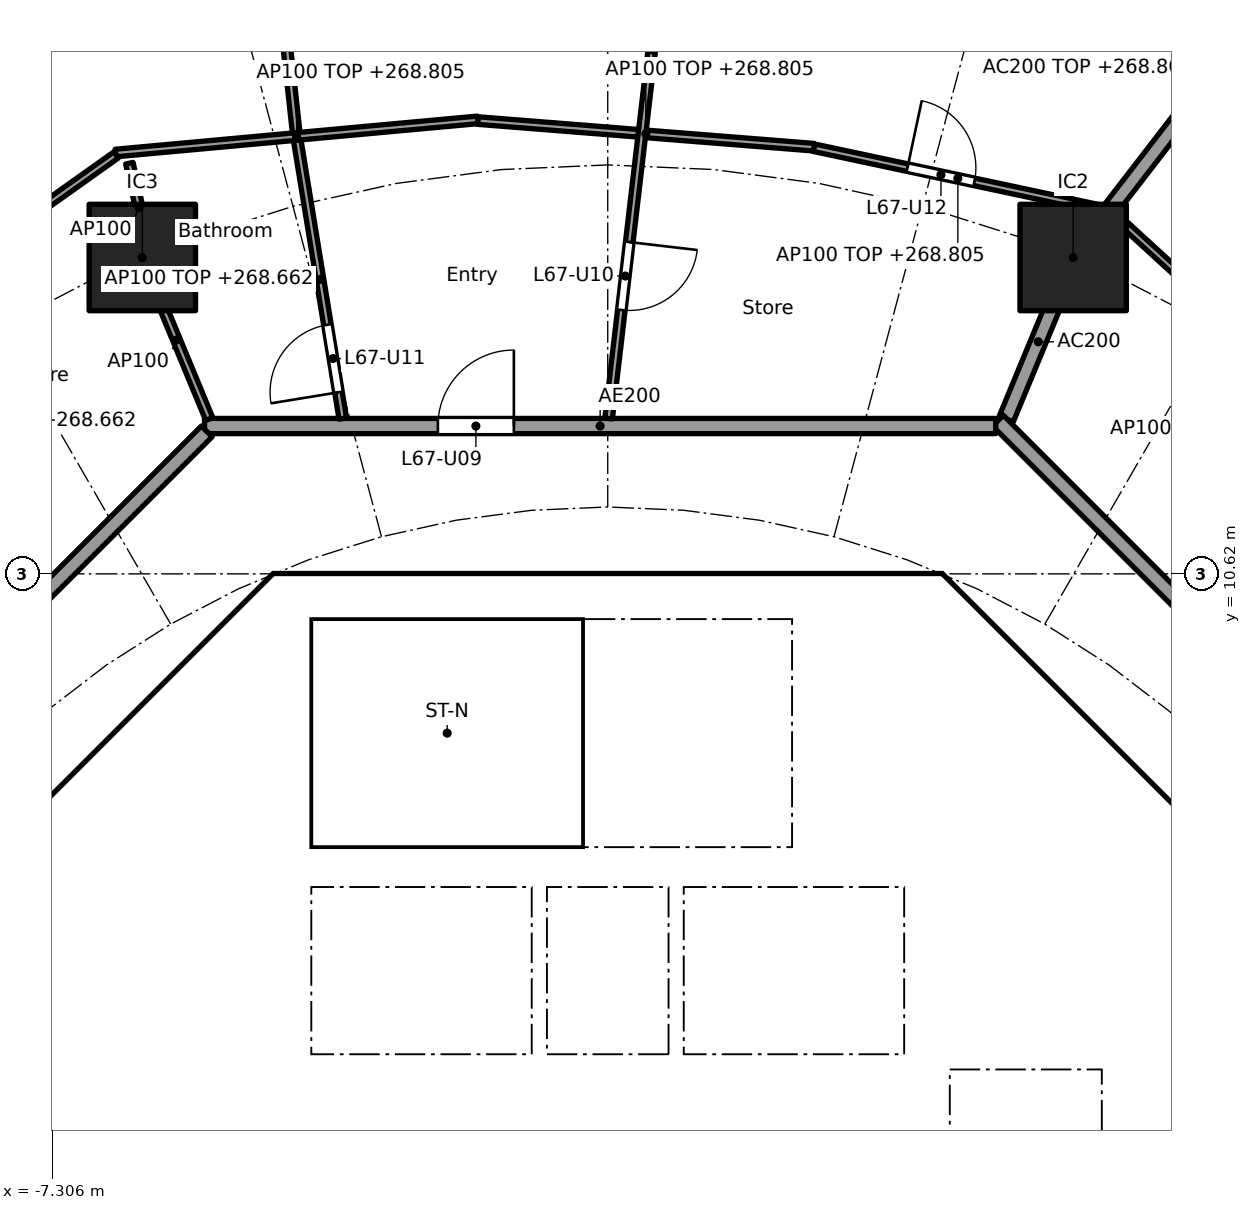
"""IFC4 building model, lengths in metres.
Left out: names, types, materials, properties, quantities, classifications, styles, units other than length and angle.
Written with IfcOpenShell. Run it as: python <this file> out.ifc"""

import sys

from ifc_helpers import new_model, si_unit, direction, frame, frame_2d, origin, origin_2d, place, context, subcontext, project, spatial, polyline, rectangle, outline, extrude, element, fill, save


model = new_model("IFC4")
c1 = context("Model", 3, precision=1e-05, world=origin(), true_north=direction((0.0, 1.0)))
c2 = subcontext(c1, "Body", "Model", "MODEL_VIEW")
j1 = project(units=[si_unit("LENGTHUNIT", "METRE"), si_unit("PLANEANGLEUNIT", "RADIAN")], contexts=[c1])
p1 = place(None, origin())
s1 = spatial("IfcSite", under=j1, at=p1, CompositionType="ELEMENT")
p2 = place(p1, origin())
s2 = spatial("IfcBuilding", under=s1, at=p2, CompositionType="ELEMENT")
p3 = place(p2, frame((0.0, 0.0, 265.9)))
s3 = spatial("IfcBuildingStorey", under=s2, at=p3, CompositionType="ELEMENT", Elevation=265.9)
for number, where, z_axis, x_axis in (
    (1, (6.123, 14.782, 0.0), (0.0, 0.0, 1.0), (1.0, 0.0, 0.0)),
    (2, (-6.123, 14.782, 0.0), (0.0, 0.0, 1.0), (1.0, 0.0, 0.0)),
):
    element("IfcColumn", number, at=place(p3, frame(where, z_axis=z_axis, x_axis=x_axis)), inside=s3, PredefinedType="COLUMN", context=c2, shape_type="SweptSolid", body=[
        extrude(rectangle(XDim=1.4, YDim=1.4, at=origin_2d()), origin(), (0.0, 0.0, 1.0), 3.7),
    ])
p4 = place(p3, frame((9.988, 4.613, 0.0), z_axis=(0.0, 0.0, 1.0), x_axis=(-0.707106781187, 0.707106781187, 0.0)))
e3 = element("IfcWall", 3, at=p4, inside=s3, PredefinedType="SHEAR", context=c2, shape_type="SweptSolid", body=[
    extrude(rectangle(XDim=7.602, YDim=0.6, at=frame_2d((3.801, 0.0))), origin(), (0.0, 0.0, 1.0), 3.44),
])
p5 = place(p4, frame((3.201, 0.0, 0.0)))
e4 = element("IfcOpeningElement", 4, at=p5, cuts=e3, PredefinedType="OPENING", context=c2, shape_type="SweptSolid", body=[
    extrude(rectangle(XDim=1.2, YDim=2.1, at=frame_2d((0.6, 1.05))), frame((0.0, 0.31, 0.0), z_axis=(0.0, -1.0, 0.0), x_axis=(1.0, 0.0, 0.0)), (0.0, 0.0, 1.0), 0.62),
])
p6 = place(p3, frame((-4.613, 9.988, 0.0), z_axis=(0.0, 0.0, 1.0), x_axis=(-0.707106781187, -0.707106781187, 0.0)))
e5 = element("IfcWall", 5, at=p6, inside=s3, PredefinedType="SHEAR", context=c2, shape_type="SweptSolid", body=[
    extrude(rectangle(XDim=7.602, YDim=0.6, at=frame_2d((3.801, 0.0))), origin(), (0.0, 0.0, 1.0), 3.44),
])
p7 = place(p6, frame((0.351, 0.0, 0.0)))
e6 = element("IfcOpeningElement", 6, at=p7, cuts=e5, PredefinedType="OPENING", context=c2, shape_type="SweptSolid", body=[
    extrude(rectangle(XDim=1.1, YDim=2.1, at=frame_2d((0.55, 1.05))), frame((0.0, 0.31, 0.0), z_axis=(0.0, -1.0, 0.0), x_axis=(1.0, 0.0, 0.0)), (0.0, 0.0, 1.0), 0.62),
])
p8 = place(p3, frame((-5.8, 4.3, 0.0), z_axis=(0.0, 0.0, 1.0), x_axis=(0.0, 1.0, 0.0)))
e7 = element("IfcWall", 7, at=p8, inside=s3, PredefinedType="PARTITIONING", context=c2, shape_type="SweptSolid", body=[
    extrude(rectangle(XDim=3.927, YDim=0.15, at=frame_2d((1.963, 0.0))), origin(), (0.0, 0.0, 1.0), 3.44),
])
p9 = place(p8, frame((0.262, 0.0, 0.0)))
e8 = element("IfcOpeningElement", 8, at=p9, cuts=e7, PredefinedType="OPENING", context=c2, shape_type="SweptSolid", body=[
    extrude(rectangle(XDim=0.9, YDim=2.1, at=frame_2d((0.45, 1.05))), frame((0.0, 0.085, 0.0), z_axis=(0.0, -1.0, 0.0), x_axis=(1.0, 0.0, 0.0)), (0.0, 0.0, 1.0), 0.17),
])
p10 = place(p8, frame((2.338, 0.0, 0.0)))
e9 = element("IfcOpeningElement", 9, at=p10, cuts=e7, PredefinedType="OPENING", context=c2, shape_type="SweptSolid", body=[
    extrude(rectangle(XDim=0.9, YDim=2.1, at=frame_2d((0.45, 1.05))), frame((0.0, 0.085, 0.0), z_axis=(0.0, -1.0, 0.0), x_axis=(1.0, 0.0, 0.0)), (0.0, 0.0, 1.0), 0.17),
])
p11 = place(p3, frame((4.0, 4.3, 0.0), z_axis=(0.0, 0.0, 1.0), x_axis=(0.0, 1.0, 0.0)))
e10 = element("IfcWall", 10, at=p11, inside=s3, PredefinedType="SOLIDWALL", context=c2, shape_type="SweptSolid", body=[
    extrude(rectangle(XDim=2.2, YDim=0.2, at=frame_2d((1.1, 0.0))), origin(), (0.0, 0.0, 1.0), 3.44),
])
p12 = place(p11, frame((0.55, 0.0, 0.0)))
e11 = element("IfcOpeningElement", 11, at=p12, cuts=e10, PredefinedType="OPENING", context=c2, shape_type="SweptSolid", body=[
    extrude(rectangle(XDim=1.1, YDim=2.1, at=frame_2d((0.55, 1.05))), frame((0.0, 0.11, 0.0), z_axis=(0.0, -1.0, 0.0), x_axis=(1.0, 0.0, 0.0)), (0.0, 0.0, 1.0), 0.22),
])
p13 = place(p3, frame((-4.0, 4.3, 0.0), z_axis=(0.0, 0.0, 1.0), x_axis=(0.0, 1.0, 0.0)))
e12 = element("IfcWall", 12, at=p13, inside=s3, PredefinedType="SOLIDWALL", context=c2, shape_type="SweptSolid", body=[
    extrude(rectangle(XDim=2.2, YDim=0.2, at=frame_2d((1.1, 0.0))), origin(), (0.0, 0.0, 1.0), 3.44),
])
p14 = place(p13, frame((0.55, 0.0, 0.0)))
e13 = element("IfcOpeningElement", 13, at=p14, cuts=e12, PredefinedType="OPENING", context=c2, shape_type="SweptSolid", body=[
    extrude(rectangle(XDim=1.1, YDim=2.1, at=frame_2d((0.55, 1.05))), frame((0.0, 0.11, 0.0), z_axis=(0.0, -1.0, 0.0), x_axis=(1.0, 0.0, 0.0)), (0.0, 0.0, 1.0), 0.22),
])
p15 = place(p3, frame((6.7, 4.0, 0.0), z_axis=(0.0, 0.0, 1.0), x_axis=(1.0, 0.0, 0.0)))
e14 = element("IfcWall", 14, at=p15, inside=s3, PredefinedType="SOLIDWALL", context=c2, shape_type="SweptSolid", body=[
    extrude(rectangle(XDim=3.325, YDim=0.2, at=frame_2d((1.662, 0.0))), origin(), (0.0, 0.0, 1.0), 3.44),
])
p16 = place(p15, frame((1.25, 0.0, 0.0)))
e15 = element("IfcOpeningElement", 15, at=p16, cuts=e14, PredefinedType="OPENING", context=c2, shape_type="SweptSolid", body=[
    extrude(rectangle(XDim=1.1, YDim=2.1, at=frame_2d((0.55, 1.05))), frame((0.0, 0.11, 0.0), z_axis=(0.0, -1.0, 0.0), x_axis=(1.0, 0.0, 0.0)), (0.0, 0.0, 1.0), 0.22),
])
p17 = place(p3, frame((4.0, 7.025, 0.0), z_axis=(0.0, 0.0, 1.0), x_axis=(0.0, 1.0, 0.0)))
e16 = element("IfcWall", 16, at=p17, inside=s3, PredefinedType="SOLIDWALL", context=c2, shape_type="SweptSolid", body=[
    extrude(rectangle(XDim=3.0, YDim=0.2, at=frame_2d((1.5, 0.0))), origin(), (0.0, 0.0, 1.0), 3.44),
])
p18 = place(p17, frame((0.925, 0.0, 0.0)))
e17 = element("IfcOpeningElement", 17, at=p18, cuts=e16, PredefinedType="OPENING", context=c2, shape_type="SweptSolid", body=[
    extrude(rectangle(XDim=1.1, YDim=2.1, at=frame_2d((0.55, 1.05))), frame((0.0, 0.11, 0.0), z_axis=(0.0, -1.0, 0.0), x_axis=(1.0, 0.0, 0.0)), (0.0, 0.0, 1.0), 0.22),
])
p19 = place(p3, origin())
e18 = element("IfcWall", 18, at=p19, inside=s3, PredefinedType="SHEAR", context=c2, shape_type="SweptSolid", body=[
    extrude(outline(polyline([(-4.152, 10.025), (-4.401, 9.776), (-4.825, 10.2), (-4.401, 10.625), (4.401, 10.625), (4.825, 10.2), (4.401, 9.776), (4.152, 10.025), (-4.152, 10.025)])), origin(), (0.0, 0.0, 1.0), 3.44),
])
p20 = place(p3, frame((-10.025, 4.0, 0.0), z_axis=(0.0, 0.0, 1.0), x_axis=(1.0, 0.0, 0.0)))
e19 = element("IfcWall", 19, at=p20, inside=s3, PredefinedType="PARTITIONING", context=c2, shape_type="SweptSolid", body=[
    extrude(rectangle(XDim=3.325, YDim=0.2, at=frame_2d((1.662, 0.0))), origin(), (0.0, 0.0, 1.0), 3.44),
])
p21 = place(p3, frame((-8.301, 5.8, 0.0), z_axis=(0.0, 0.0, 1.0), x_axis=(1.0, 0.0, 0.0)))
e20 = element("IfcWall", 20, at=p21, inside=s3, PredefinedType="PARTITIONING", context=c2, shape_type="SweptSolid", body=[
    extrude(rectangle(XDim=2.426, YDim=0.15, at=frame_2d((1.213, 0.0))), origin(), (0.0, 0.0, 1.0), 3.44),
])
for number, where, z_axis, x_axis in (
    (21, (-0.9, 4.3, 0.0), (0.0, 0.0, 1.0), (0.0, 1.0, 0.0)),
    (22, (0.9, 4.3, 0.0), (0.0, 0.0, 1.0), (0.0, 1.0, 0.0)),
):
    element("IfcWall", number, at=place(p3, frame(where, z_axis=z_axis, x_axis=x_axis)), inside=s3, PredefinedType="SOLIDWALL", context=c2, shape_type="SweptSolid", body=[
        extrude(rectangle(XDim=2.2, YDim=0.2, at=frame_2d((1.1, 0.0))), origin(), (0.0, 0.0, 1.0), 3.44),
    ])
p22 = place(p3, origin())
e23 = element("IfcWall", 23, at=p22, inside=s3, PredefinedType="SOLIDWALL", context=c2, shape_type="SweptSolid", body=[
    extrude(outline(polyline([(-6.7, 4.3), (6.7, 4.3), (6.7, 2.1), (6.5, 2.1), (6.5, 4.1), (4.5, 4.1), (4.5, 2.1), (4.3, 2.1), (4.3, 4.1), (2.3, 4.1), (2.3, 2.1), (2.1, 2.1), (2.1, 4.1), (0.1, 4.1), (0.1, 2.1), (-0.1, 2.1), (-0.1, 4.1), (-4.3, 4.1), (-4.3, 2.1), (-4.5, 2.1), (-4.5, 4.1), (-6.5, 4.1), (-6.5, 2.1), (-6.7, 2.1), (-6.7, 4.3)])), origin(), (0.0, 0.0, 1.0), 3.44),
])
p23 = place(p3, origin())
e24 = element("IfcWall", 24, at=p23, inside=s3, PredefinedType="SOLIDWALL", context=c2, shape_type="SweptSolid", body=[
    extrude(outline(polyline([(-3.9, 7.025), (-4.1, 7.025), (-4.1, 10.025), (-3.9, 10.025), (-3.9, 7.025)])), origin(), (0.0, 0.0, 1.0), 3.44),
])
p24 = place(p3, origin())
e25 = element("IfcWall", 25, at=p24, inside=s3, PredefinedType="SOLIDWALL", context=c2, shape_type="SweptSolid", body=[
    extrude(outline(polyline([(4.1, 6.5), (-4.1, 6.5), (-4.1, 7.025), (4.1, 7.025), (4.1, 6.5)])), origin(), (0.0, 0.0, 1.0), 3.44),
])
p25 = place(p3, origin())
e26 = element("IfcWall", 26, at=p25, inside=s3, PredefinedType="SOLIDWALL", context=c2, shape_type="SweptSolid", body=[
    extrude(outline(polyline([(7.025, -3.9), (6.7, -3.9), (6.7, 3.9), (7.025, 3.9), (7.025, -3.9)])), origin(), (0.0, 0.0, 1.0), 3.44),
])
p26 = place(p3, frame((5.243, 12.657, 0.0), z_axis=(0.0, 0.0, 1.0), x_axis=(0.382691608661, 0.923876145736, 0.0)))
e27 = element("IfcWall", 27, at=p26, inside=s3, PredefinedType="PARTITIONING", context=c2, shape_type="SweptSolid", body=[
    extrude(rectangle(XDim=2.2, YDim=0.2, at=frame_2d((1.1, 0.0))), origin(), (0.0, 0.0, 1.0), 3.44),
])
p27 = place(p3, frame((6.154, 14.822, 0.0), z_axis=(0.0, 0.0, 1.0), x_axis=(0.610687612043, 0.791871606068, 0.0)))
e28 = element("IfcWall", 28, at=p27, inside=s3, PredefinedType="PARTITIONING", context=c2, shape_type="SweptSolid", body=[
    extrude(rectangle(XDim=4.455, YDim=0.2, at=frame_2d((2.228, 0.0))), origin(), (0.0, 0.0, 1.0), 2.905),
])
p28 = place(p3, frame((12.635, 5.134, 0.0), z_axis=(0.0, 0.0, 1.0), x_axis=(-0.707106781187, 0.707106781187, 0.0)))
e29 = element("IfcWall", 29, at=p28, inside=s3, PredefinedType="PARTITIONING", context=c2, shape_type="SweptSolid", body=[
    extrude(rectangle(XDim=10.609, YDim=0.2, at=frame_2d((5.305, 0.0))), origin(), (0.0, 0.0, 1.0), 3.44),
])
p29 = place(p3, frame((5.104, 12.565, 0.0), z_axis=(0.0, 0.0, 1.0), x_axis=(-1.0, 0.0, 0.0)))
e30 = element("IfcWall", 30, at=p29, inside=s3, PredefinedType="PARTITIONING", context=c2, shape_type="SweptSolid", body=[
    extrude(rectangle(XDim=10.409, YDim=0.2, at=frame_2d((5.205, 0.0))), origin(), (0.0, 0.0, 1.0), 3.44),
])
p30 = place(p29, frame((6.339, 0.0, 0.0)))
e31 = element("IfcOpeningElement", 31, at=p30, cuts=e30, PredefinedType="OPENING", context=c2, shape_type="SweptSolid", body=[
    extrude(rectangle(XDim=1.0, YDim=2.1, at=frame_2d((0.5, 1.05))), frame((0.0, 0.11, 0.0), z_axis=(0.0, -1.0, 0.0), x_axis=(1.0, 0.0, 0.0)), (0.0, 0.0, 1.0), 0.22),
])
p31 = place(p3, frame((-5.275, 12.494, 0.0), z_axis=(0.0, 0.0, 1.0), x_axis=(-0.707106781187, -0.707106781187, 0.0)))
e32 = element("IfcWall", 32, at=p31, inside=s3, PredefinedType="PARTITIONING", context=c2, shape_type="SweptSolid", body=[
    extrude(rectangle(XDim=10.209, YDim=0.2, at=frame_2d((5.104, 0.0))), origin(), (0.0, 0.0, 1.0), 3.44),
])
p32 = place(p3, frame((10.972, 11.398, 0.0), z_axis=(0.0, 0.0, 1.0), x_axis=(-0.737830272434, 0.674986288069, 0.0)))
e33 = element("IfcWall", 33, at=p32, inside=s3, PredefinedType="PARTITIONING", context=c2, shape_type="SweptSolid", body=[
    extrude(rectangle(XDim=5.827, YDim=0.1, at=frame_2d((2.914, 0.0))), origin(), (0.0, 0.0, 1.0), 2.905),
])
p33 = place(p3, frame((6.5, 15.419, 0.0), z_axis=(0.0, 0.0, 1.0), x_axis=(-0.978053492557, 0.208353943321, 0.0)))
e34 = element("IfcWall", 34, at=p33, inside=s3, PredefinedType="PARTITIONING", context=c2, shape_type="SweptSolid", body=[
    extrude(rectangle(XDim=3.874, YDim=0.1, at=frame_2d((1.937, 0.0))), origin(), (0.0, 0.0, 1.0), 2.905),
])
p34 = place(p33, frame((1.714, 0.0, 0.0)))
e35 = element("IfcOpeningElement", 35, at=p34, cuts=e34, PredefinedType="OPENING", context=c2, shape_type="SweptSolid", body=[
    extrude(rectangle(XDim=0.9, YDim=2.1, at=frame_2d((0.45, 1.05))), frame((0.0, 0.06, 0.0), z_axis=(0.0, -1.0, 0.0), x_axis=(1.0, 0.0, 0.0)), (0.0, 0.0, 1.0), 0.12),
])
p35 = place(p3, frame((2.713, 16.233, 0.0), z_axis=(0.0, 0.0, 1.0), x_axis=(-0.996870142942, 0.079056423588, 0.0)))
e36 = element("IfcWall", 36, at=p35, inside=s3, PredefinedType="PARTITIONING", context=c2, shape_type="SweptSolid", body=[
    extrude(rectangle(XDim=4.438, YDim=0.1, at=frame_2d((2.219, 0.0))), origin(), (0.0, 0.0, 1.0), 2.905),
])
p36 = place(p3, frame((0.012, 12.664, 0.0), z_axis=(0.0, 0.0, 1.0), x_axis=(0.11636251357, 0.993206808996, 0.0)))
e37 = element("IfcWall", 37, at=p36, inside=s3, PredefinedType="PARTITIONING", context=c2, shape_type="SweptSolid", body=[
    extrude(rectangle(XDim=9.765, YDim=0.1, at=frame_2d((4.882, 0.0))), origin(), (0.0, 0.0, 1.0), 2.762),
])
p37 = place(p36, frame((1.437, 0.0, 0.0)))
e38 = element("IfcOpeningElement", 38, at=p37, cuts=e37, PredefinedType="OPENING", context=c2, shape_type="SweptSolid", body=[
    extrude(rectangle(XDim=0.9, YDim=2.1, at=frame_2d((0.45, 1.05))), frame((0.0, 0.06, 0.0), z_axis=(0.0, -1.0, 0.0), x_axis=(1.0, 0.0, 0.0)), (0.0, 0.0, 1.0), 0.12),
])
p38 = place(p36, frame((6.319, 0.0, 0.0)))
e39 = element("IfcOpeningElement", 39, at=p38, cuts=e37, PredefinedType="OPENING", context=c2, shape_type="SweptSolid", body=[
    extrude(rectangle(XDim=0.9, YDim=2.1, at=frame_2d((0.45, 1.05))), frame((0.0, 0.06, 0.0), z_axis=(0.0, -1.0, 0.0), x_axis=(1.0, 0.0, 0.0)), (0.0, 0.0, 1.0), 0.12),
])
p39 = place(p3, frame((-1.711, 16.592, 0.0), z_axis=(0.0, 0.0, 1.0), x_axis=(-0.995843707015, -0.091078599017, 0.0)))
e40 = element("IfcWall", 40, at=p39, inside=s3, PredefinedType="PARTITIONING", context=c2, shape_type="SweptSolid", body=[
    extrude(rectangle(XDim=4.785, YDim=0.1, at=frame_2d((2.392, 0.0))), origin(), (0.0, 0.0, 1.0), 2.905),
])
p40 = place(p3, frame((-3.486, 12.663, 0.0), z_axis=(0.0, 0.0, 1.0), x_axis=(-0.161602751674, 0.986855891532, 0.0)))
e41 = element("IfcWall", 41, at=p40, inside=s3, PredefinedType="PARTITIONING", context=c2, shape_type="SweptSolid", body=[
    extrude(rectangle(XDim=3.71, YDim=0.1, at=frame_2d((1.855, 0.0))), origin(), (0.0, 0.0, 1.0), 2.762),
])
p41 = place(p40, frame((0.35, 0.0, 0.0)))
e42 = element("IfcOpeningElement", 42, at=p41, cuts=e41, PredefinedType="OPENING", context=c2, shape_type="SweptSolid", body=[
    extrude(rectangle(XDim=0.9, YDim=2.1, at=frame_2d((0.45, 1.05))), frame((0.0, 0.06, 0.0), z_axis=(0.0, -1.0, 0.0), x_axis=(1.0, 0.0, 0.0)), (0.0, 0.0, 1.0), 0.12),
])
p42 = place(p3, frame((-4.099, 16.424, 0.0), z_axis=(0.0, 0.0, 1.0), x_axis=(-0.10867295252, 0.99407755703, 0.0)))
e43 = element("IfcWall", 43, at=p42, inside=s3, PredefinedType="PARTITIONING", context=c2, shape_type="SweptSolid", body=[
    extrude(rectangle(XDim=5.974, YDim=0.1, at=frame_2d((2.987, 0.0))), origin(), (0.0, 0.0, 1.0), 2.983),
])
p43 = place(p42, frame((2.537, 0.0, 0.0)))
e44 = element("IfcOpeningElement", 44, at=p43, cuts=e43, PredefinedType="OPENING", context=c2, shape_type="SweptSolid", body=[
    extrude(rectangle(XDim=0.9, YDim=2.1, at=frame_2d((0.45, 1.05))), frame((0.0, 0.06, 0.0), z_axis=(0.0, -1.0, 0.0), x_axis=(1.0, 0.0, 0.0)), (0.0, 0.0, 1.0), 0.12),
])
p44 = place(p3, frame((-5.243, 12.657, 0.0), z_axis=(0.0, 0.0, 1.0), x_axis=(-0.382719158442, 0.923864733477, 0.0)))
e45 = element("IfcWall", 45, at=p44, inside=s3, PredefinedType="PARTITIONING", context=c2, shape_type="SweptSolid", body=[
    extrude(rectangle(XDim=2.25, YDim=0.1, at=frame_2d((1.125, 0.0))), origin(), (0.0, 0.0, 1.0), 3.44),
])
p45 = place(p3, frame((-6.467, 16.132, 0.0), z_axis=(0.0, 0.0, 1.0), x_axis=(-0.815192286069, -0.579190414919, 0.0)))
e46 = element("IfcWall", 46, at=p45, inside=s3, PredefinedType="PARTITIONING", context=c2, shape_type="SweptSolid", body=[
    extrude(rectangle(XDim=4.086, YDim=0.1, at=frame_2d((2.043, 0.0))), origin(), (0.0, 0.0, 1.0), 2.905),
])
p46 = place(p45, frame((2.09, 0.0, 0.0)))
e47 = element("IfcOpeningElement", 47, at=p46, cuts=e46, PredefinedType="OPENING", context=c2, shape_type="SweptSolid", body=[
    extrude(rectangle(XDim=0.9, YDim=2.1, at=frame_2d((0.45, 1.05))), frame((0.0, 0.06, 0.0), z_axis=(0.0, -1.0, 0.0), x_axis=(1.0, 0.0, 0.0)), (0.0, 0.0, 1.0), 0.12),
])
p47 = place(p3, frame((-6.036, 14.853, 0.0), z_axis=(0.0, 0.0, 1.0), x_axis=(-0.215009518078, 0.976611953202, 0.0)))
e48 = element("IfcWall", 48, at=p47, inside=s3, PredefinedType="PARTITIONING", context=c2, shape_type="SweptSolid", body=[
    extrude(rectangle(XDim=1.198, YDim=0.1, at=frame_2d((0.599, 0.0))), origin(), (0.0, 0.0, 1.0), 3.44),
])
p48 = place(p12, origin())
e49 = element("IfcDoor", 49, at=p48, inside=s3, OperationType="DOUBLE_DOOR_SLIDING", PredefinedType="DOOR", context=c2, shape_type="SweptSolid", body=[
    extrude(rectangle(XDim=1.1, YDim=2.1, at=frame_2d((0.55, 1.05))), frame((0.0, 0.025, 0.0), z_axis=(0.0, -1.0, 0.0), x_axis=(1.0, 0.0, 0.0)), (0.0, 0.0, 1.0), 0.05),
])
fill(e11, e49)
p49 = place(p14, origin())
e50 = element("IfcDoor", 50, at=p49, inside=s3, OperationType="DOUBLE_DOOR_SLIDING", PredefinedType="DOOR", context=c2, shape_type="SweptSolid", body=[
    extrude(rectangle(XDim=1.1, YDim=2.1, at=frame_2d((0.55, 1.05))), frame((0.0, 0.025, 0.0), z_axis=(0.0, -1.0, 0.0), x_axis=(1.0, 0.0, 0.0)), (0.0, 0.0, 1.0), 0.05),
])
fill(e13, e50)
p50 = place(p18, origin())
e51 = element("IfcDoor", 51, at=p50, inside=s3, OperationType="SINGLE_SWING_LEFT", PredefinedType="DOOR", context=c2, shape_type="SweptSolid", body=[
    extrude(rectangle(XDim=1.1, YDim=2.1, at=frame_2d((0.55, 1.05))), frame((0.0, 0.025, 0.0), z_axis=(0.0, -1.0, 0.0), x_axis=(1.0, 0.0, 0.0)), (0.0, 0.0, 1.0), 0.05),
])
fill(e17, e51)
p51 = place(p9, origin())
e52 = element("IfcDoor", 52, at=p51, inside=s3, OperationType="SINGLE_SWING_RIGHT", PredefinedType="DOOR", context=c2, shape_type="SweptSolid", body=[
    extrude(rectangle(XDim=0.9, YDim=2.1, at=frame_2d((0.45, 1.05))), frame((0.0, 0.025, 0.0), z_axis=(0.0, -1.0, 0.0), x_axis=(1.0, 0.0, 0.0)), (0.0, 0.0, 1.0), 0.05),
])
fill(e8, e52)
p52 = place(p10, origin())
e53 = element("IfcDoor", 53, at=p52, inside=s3, OperationType="SINGLE_SWING_RIGHT", PredefinedType="DOOR", context=c2, shape_type="SweptSolid", body=[
    extrude(rectangle(XDim=0.9, YDim=2.1, at=frame_2d((0.45, 1.05))), frame((0.0, 0.025, 0.0), z_axis=(0.0, -1.0, 0.0), x_axis=(1.0, 0.0, 0.0)), (0.0, 0.0, 1.0), 0.05),
])
fill(e9, e53)
p53 = place(p5, origin())
e54 = element("IfcDoor", 54, at=p53, inside=s3, OperationType="SINGLE_SWING_RIGHT", PredefinedType="DOOR", context=c2, shape_type="SweptSolid", body=[
    extrude(rectangle(XDim=1.2, YDim=2.1, at=frame_2d((0.6, 1.05))), frame((0.0, 0.025, 0.0), z_axis=(0.0, -1.0, 0.0), x_axis=(1.0, 0.0, 0.0)), (0.0, 0.0, 1.0), 0.05),
])
fill(e4, e54)
p54 = place(p7, origin())
e55 = element("IfcDoor", 55, at=p54, inside=s3, OperationType="SINGLE_SWING_RIGHT", PredefinedType="DOOR", context=c2, shape_type="SweptSolid", body=[
    extrude(rectangle(XDim=1.1, YDim=2.1, at=frame_2d((0.55, 1.05))), frame((0.0, 0.025, 0.0), z_axis=(0.0, -1.0, 0.0), x_axis=(1.0, 0.0, 0.0)), (0.0, 0.0, 1.0), 0.05),
])
fill(e6, e55)
p55 = place(p30, frame((1.0, 0.0, 0.0), x_axis=(-1.0, 0.0, 0.0)))
e56 = element("IfcDoor", 56, at=p55, inside=s3, OperationType="SINGLE_SWING_RIGHT", PredefinedType="DOOR", context=c2, shape_type="SweptSolid", body=[
    extrude(rectangle(XDim=1.0, YDim=2.1, at=frame_2d((0.5, 1.05))), frame((0.0, 0.025, 0.0), z_axis=(0.0, -1.0, 0.0), x_axis=(1.0, 0.0, 0.0)), (0.0, 0.0, 1.0), 0.05),
])
fill(e31, e56)
p56 = place(p37, frame((0.9, 0.0, 0.0), x_axis=(-1.0, 0.0, 0.0)))
e57 = element("IfcDoor", 57, at=p56, inside=s3, OperationType="SINGLE_SWING_LEFT", PredefinedType="DOOR", context=c2, shape_type="SweptSolid", body=[
    extrude(rectangle(XDim=0.9, YDim=2.1, at=frame_2d((0.45, 1.05))), frame((0.0, 0.025, 0.0), z_axis=(0.0, -1.0, 0.0), x_axis=(1.0, 0.0, 0.0)), (0.0, 0.0, 1.0), 0.05),
])
fill(e38, e57)
p57 = place(p41, origin())
e58 = element("IfcDoor", 58, at=p57, inside=s3, OperationType="SINGLE_SWING_LEFT", PredefinedType="DOOR", context=c2, shape_type="SweptSolid", body=[
    extrude(rectangle(XDim=0.9, YDim=2.1, at=frame_2d((0.45, 1.05))), frame((0.0, 0.025, 0.0), z_axis=(0.0, -1.0, 0.0), x_axis=(1.0, 0.0, 0.0)), (0.0, 0.0, 1.0), 0.05),
])
fill(e42, e58)
p58 = place(p34, frame((0.9, 0.0, 0.0), x_axis=(-1.0, 0.0, 0.0)))
e59 = element("IfcDoor", 59, at=p58, inside=s3, OperationType="SINGLE_SWING_LEFT", PredefinedType="DOOR", context=c2, shape_type="SweptSolid", body=[
    extrude(rectangle(XDim=0.9, YDim=2.1, at=frame_2d((0.45, 1.05))), frame((0.0, 0.025, 0.0), z_axis=(0.0, -1.0, 0.0), x_axis=(1.0, 0.0, 0.0)), (0.0, 0.0, 1.0), 0.05),
])
fill(e35, e59)
save(model, sys.argv[1])
